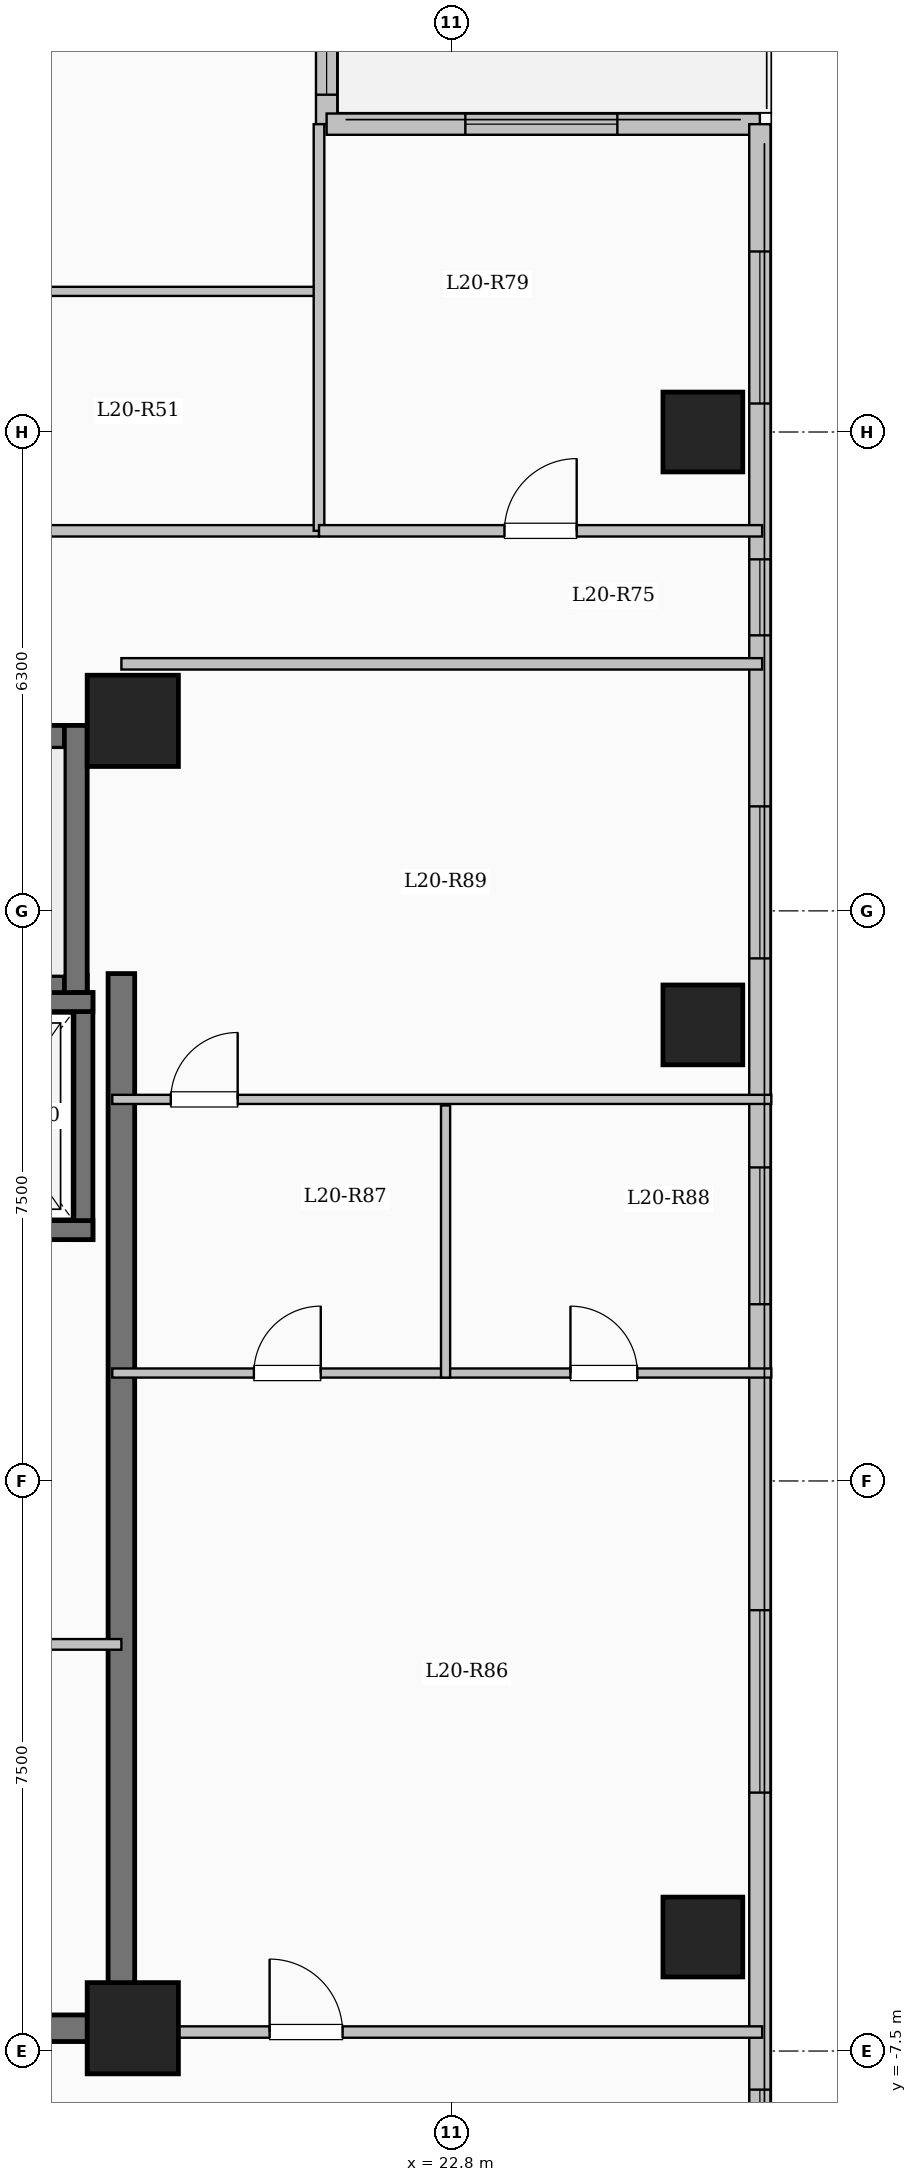
"""IFC4 building model, lengths in metres.
Left out: names, types, materials, properties, quantities, classifications, styles, units other than length and angle.
Written with IfcOpenShell. Run it as: python <this file> out.ifc"""

import sys

from ifc_helpers import new_model, si_unit, direction, frame, frame_2d, origin, origin_2d, place, context, subcontext, project, spatial, rectangle, extrude, element, fill, save


model = new_model("IFC4")
c1 = context("Model", 3, precision=1e-05, world=origin(), true_north=direction((0.0, 1.0)))
c2 = subcontext(c1, "Body", "Model", "MODEL_VIEW")
j1 = project(units=[si_unit("LENGTHUNIT", "METRE"), si_unit("PLANEANGLEUNIT", "RADIAN")], contexts=[c1])
p1 = place(None, origin())
s1 = spatial("IfcSite", under=j1, at=p1, CompositionType="ELEMENT")
p2 = place(p1, origin())
s2 = spatial("IfcBuilding", under=s1, at=p2, CompositionType="ELEMENT")
p3 = place(p2, frame((0.0, 0.0, 78.3)))
s3 = spatial("IfcBuildingStorey", under=s2, at=p3, CompositionType="ELEMENT", Elevation=78.3)
for number, where, z_axis, x_axis in (
    (1, (18.6, -7.2, 0.0), (0.0, 0.0, 1.0), (1.0, 0.0, 0.0)),
    (2, (18.6, 10.0, 0.0), (0.0, 0.0, 1.0), (1.0, 0.0, 0.0)),
):
    element("IfcColumn", number, at=place(p3, frame(where, z_axis=z_axis, x_axis=x_axis)), inside=s3, PredefinedType="COLUMN", context=c2, shape_type="SweptSolid", body=[
        extrude(rectangle(XDim=1.2, YDim=1.2, at=origin_2d()), origin(), (0.0, 0.0, 1.0), 3.35),
    ])
for number, where, z_axis, x_axis in (
    (3, (26.1, -6.0, 0.0), (0.0, 0.0, 1.0), (1.0, 0.0, 0.0)),
    (4, (26.1, 6.0, 0.0), (0.0, 0.0, 1.0), (1.0, 0.0, 0.0)),
    (5, (26.1, 13.8, 0.0), (0.0, 0.0, 1.0), (1.0, 0.0, 0.0)),
):
    element("IfcColumn", number, at=place(p3, frame(where, z_axis=z_axis, x_axis=x_axis)), inside=s3, PredefinedType="COLUMN", context=c2, shape_type="SweptSolid", body=[
        extrude(rectangle(XDim=1.05, YDim=1.05, at=origin_2d()), origin(), (0.0, 0.0, 1.0), 3.35),
    ])
p4 = place(p3, frame((21.15, 22.05, 0.0), z_axis=(0.0, 0.0, 1.0), x_axis=(0.0, -1.0, 0.0)))
e6 = element("IfcWall", 6, at=p4, inside=s3, PredefinedType="SOLIDWALL", context=c2, shape_type="SweptSolid", body=[
    extrude(rectangle(XDim=4.2, YDim=0.28, at=frame_2d((2.1, 0.0))), origin(), (0.0, 0.0, 1.0), 3.1),
])
p5 = place(p4, frame((1.5, 0.0, 0.0)))
e7 = element("IfcOpeningElement", 7, at=p5, cuts=e6, PredefinedType="OPENING", context=c2, shape_type="SweptSolid", body=[
    extrude(rectangle(XDim=1.1, YDim=2.2, at=frame_2d((0.55, 1.1))), frame((0.0, 0.15, 0.0), z_axis=(0.0, -1.0, 0.0), x_axis=(1.0, 0.0, 0.0)), (0.0, 0.0, 1.0), 0.3),
])
p6 = place(p4, frame((2.812, 0.0, 0.95)))
e8 = element("IfcOpeningElement", 8, at=p6, cuts=e6, PredefinedType="OPENING", context=c2, shape_type="SweptSolid", body=[
    extrude(rectangle(XDim=1.0, YDim=1.5, at=frame_2d((0.5, 0.75))), frame((0.0, 0.15, 0.0), z_axis=(0.0, -1.0, 0.0), x_axis=(1.0, 0.0, 0.0)), (0.0, 0.0, 1.0), 0.3),
])
p7 = place(p3, frame((21.15, 17.85, 0.0), z_axis=(0.0, 0.0, 1.0), x_axis=(1.0, 0.0, 0.0)))
e9 = element("IfcWall", 9, at=p7, inside=s3, PredefinedType="SOLIDWALL", context=c2, shape_type="SweptSolid", body=[
    extrude(rectangle(XDim=5.7, YDim=0.28, at=frame_2d((2.85, 0.0))), origin(), (0.0, 0.0, 1.0), 3.1),
])
p8 = place(p7, frame((1.825, 0.0, 0.9)))
e10 = element("IfcOpeningElement", 10, at=p8, cuts=e9, PredefinedType="OPENING", context=c2, shape_type="SweptSolid", body=[
    extrude(rectangle(XDim=2.0, YDim=1.7, at=frame_2d((1.0, 0.85))), frame((0.0, 0.15, 0.0), z_axis=(0.0, -1.0, 0.0), x_axis=(1.0, 0.0, 0.0)), (0.0, 0.0, 1.0), 0.3),
])
p9 = place(p3, frame((26.85, 17.85, 0.0), z_axis=(0.0, 0.0, 1.0), x_axis=(0.0, -1.0, 0.0)))
e11 = element("IfcWall", 11, at=p9, inside=s3, PredefinedType="SOLIDWALL", context=c2, shape_type="SweptSolid", body=[
    extrude(rectangle(XDim=35.7, YDim=0.28, at=frame_2d((17.85, 0.0))), origin(), (0.0, 0.0, 1.0), 3.1),
])
p10 = place(p9, frame((1.675, 0.0, 0.9)))
e12 = element("IfcOpeningElement", 12, at=p10, cuts=e11, PredefinedType="OPENING", context=c2, shape_type="SweptSolid", body=[
    extrude(rectangle(XDim=2.0, YDim=1.7, at=frame_2d((1.0, 0.85))), frame((0.0, 0.15, 0.0), z_axis=(0.0, -1.0, 0.0), x_axis=(1.0, 0.0, 0.0)), (0.0, 0.0, 1.0), 0.3),
])
p11 = place(p9, frame((5.725, 0.0, 0.95)))
e13 = element("IfcOpeningElement", 13, at=p11, cuts=e11, PredefinedType="OPENING", context=c2, shape_type="SweptSolid", body=[
    extrude(rectangle(XDim=1.0, YDim=1.5, at=frame_2d((0.5, 0.75))), frame((0.0, 0.15, 0.0), z_axis=(0.0, -1.0, 0.0), x_axis=(1.0, 0.0, 0.0)), (0.0, 0.0, 1.0), 0.3),
])
p12 = place(p9, frame((8.975, 0.0, 0.9)))
e14 = element("IfcOpeningElement", 14, at=p12, cuts=e11, PredefinedType="OPENING", context=c2, shape_type="SweptSolid", body=[
    extrude(rectangle(XDim=2.0, YDim=1.7, at=frame_2d((1.0, 0.85))), frame((0.0, 0.15, 0.0), z_axis=(0.0, -1.0, 0.0), x_axis=(1.0, 0.0, 0.0)), (0.0, 0.0, 1.0), 0.3),
])
p13 = place(p9, frame((13.725, 0.0, 0.9)))
e15 = element("IfcOpeningElement", 15, at=p13, cuts=e11, PredefinedType="OPENING", context=c2, shape_type="SweptSolid", body=[
    extrude(rectangle(XDim=1.8, YDim=1.65, at=frame_2d((0.9, 0.825))), frame((0.0, 0.15, 0.0), z_axis=(0.0, -1.0, 0.0), x_axis=(1.0, 0.0, 0.0)), (0.0, 0.0, 1.0), 0.3),
])
p14 = place(p9, frame((19.55, 0.0, 0.9)))
e16 = element("IfcOpeningElement", 16, at=p14, cuts=e11, PredefinedType="OPENING", context=c2, shape_type="SweptSolid", body=[
    extrude(rectangle(XDim=2.4, YDim=1.8, at=frame_2d((1.2, 0.9))), frame((0.0, 0.15, 0.0), z_axis=(0.0, -1.0, 0.0), x_axis=(1.0, 0.0, 0.0)), (0.0, 0.0, 1.0), 0.3),
])
p15 = place(p9, frame((25.857, 0.0, 0.9)))
e17 = element("IfcOpeningElement", 17, at=p15, cuts=e11, PredefinedType="OPENING", context=c2, shape_type="SweptSolid", body=[
    extrude(rectangle(XDim=1.5, YDim=1.65, at=frame_2d((0.75, 0.825))), frame((0.0, 0.15, 0.0), z_axis=(0.0, -1.0, 0.0), x_axis=(1.0, 0.0, 0.0)), (0.0, 0.0, 1.0), 0.3),
])
p16 = place(p9, frame((30.75, 0.0, 0.9)))
e18 = element("IfcOpeningElement", 18, at=p16, cuts=e11, PredefinedType="OPENING", context=c2, shape_type="SweptSolid", body=[
    extrude(rectangle(XDim=2.4, YDim=1.8, at=frame_2d((1.2, 0.9))), frame((0.0, 0.15, 0.0), z_axis=(0.0, -1.0, 0.0), x_axis=(1.0, 0.0, 0.0)), (0.0, 0.0, 1.0), 0.3),
])
p17 = place(p3, frame((10.0, 9.79, 0.0), z_axis=(0.0, 0.0, 1.0), x_axis=(1.0, 0.0, 0.0)))
e19 = element("IfcWall", 19, at=p17, inside=s3, PredefinedType="SHEAR", context=c2, shape_type="SweptSolid", body=[
    extrude(rectangle(XDim=8.0, YDim=0.3, at=frame_2d((4.0, 0.0))), origin(), (0.0, 0.0, 1.0), 3.35),
])
p18 = place(p3, frame((10.0, 6.5, 0.0), z_axis=(0.0, 0.0, 1.0), x_axis=(1.0, 0.0, 0.0)))
e20 = element("IfcWall", 20, at=p18, inside=s3, PredefinedType="SHEAR", context=c2, shape_type="SweptSolid", body=[
    extrude(rectangle(XDim=8.0, YDim=0.3, at=frame_2d((4.0, 0.0))), origin(), (0.0, 0.0, 1.0), 3.35),
])
p19 = place(p18, frame((0.55, 0.0, 0.0)))
e21 = element("IfcOpeningElement", 21, at=p19, cuts=e20, PredefinedType="OPENING", context=c2, shape_type="SweptSolid", body=[
    extrude(rectangle(XDim=1.0, YDim=2.15, at=frame_2d((0.5, 1.075))), frame((0.0, 0.16, 0.0), z_axis=(0.0, -1.0, 0.0), x_axis=(1.0, 0.0, 0.0)), (0.0, 0.0, 1.0), 0.32),
])
p20 = place(p3, frame((17.85, 6.35, 0.0), z_axis=(0.0, 0.0, 1.0), x_axis=(0.0, 1.0, 0.0)))
e22 = element("IfcWall", 22, at=p20, inside=s3, PredefinedType="SHEAR", context=c2, shape_type="SweptSolid", body=[
    extrude(rectangle(XDim=3.59, YDim=0.3, at=frame_2d((1.795, 0.0))), origin(), (0.0, 0.0, 1.0), 3.35),
])
p21 = place(p3, frame((17.95, 3.175, 0.0), z_axis=(0.0, 0.0, 1.0), x_axis=(0.0, 1.0, 0.0)))
e23 = element("IfcWall", 23, at=p21, inside=s3, PredefinedType="SHEAR", context=c2, shape_type="SweptSolid", body=[
    extrude(rectangle(XDim=3.25, YDim=0.25, at=frame_2d((1.625, 0.0))), origin(), (0.0, 0.0, 1.0), 3.35),
])
for number, where, z_axis, x_axis in (
    (24, (15.525, 3.3, 0.0), (0.0, 0.0, 1.0), (1.0, 0.0, 0.0)),
    (25, (15.525, 6.3, 0.0), (0.0, 0.0, 1.0), (1.0, 0.0, 0.0)),
):
    element("IfcWall", number, at=place(p3, frame(where, z_axis=z_axis, x_axis=x_axis)), inside=s3, PredefinedType="SHEAR", context=c2, shape_type="SweptSolid", body=[
        extrude(rectangle(XDim=2.55, YDim=0.25, at=frame_2d((1.275, 0.0))), origin(), (0.0, 0.0, 1.0), 3.35),
    ])
p22 = place(p3, frame((18.45, -7.375, 0.0), z_axis=(0.0, 0.0, 1.0), x_axis=(0.0, 1.0, 0.0)))
e26 = element("IfcWall", 26, at=p22, inside=s3, PredefinedType="SHEAR", context=c2, shape_type="SweptSolid", body=[
    extrude(rectangle(XDim=14.05, YDim=0.35, at=frame_2d((7.025, 0.0))), origin(), (0.0, 0.0, 1.0), 3.35),
])
p23 = place(p3, frame((10.075, -7.2, 0.0), z_axis=(0.0, 0.0, 1.0), x_axis=(1.0, 0.0, 0.0)))
e27 = element("IfcWall", 27, at=p23, inside=s3, PredefinedType="SHEAR", context=c2, shape_type="SweptSolid", body=[
    extrude(rectangle(XDim=8.55, YDim=0.35, at=frame_2d((4.275, 0.0))), origin(), (0.0, 0.0, 1.0), 3.35),
])
p24 = place(p3, frame((15.4, -2.15, 0.0), z_axis=(0.0, 0.0, 1.0), x_axis=(1.0, 0.0, 0.0)))
e28 = element("IfcWall", 28, at=p24, inside=s3, PredefinedType="PARTITIONING", context=c2, shape_type="SweptSolid", body=[
    extrude(rectangle(XDim=3.05, YDim=0.14, at=frame_2d((1.525, 0.0))), origin(), (0.0, 0.0, 1.0), 3.1),
])
p25 = place(p24, frame((1.05, 0.0, 0.0)))
e29 = element("IfcOpeningElement", 29, at=p25, cuts=e28, PredefinedType="OPENING", context=c2, shape_type="SweptSolid", body=[
    extrude(rectangle(XDim=0.9, YDim=2.08, at=frame_2d((0.45, 1.04))), frame((0.0, 0.08, 0.0), z_axis=(0.0, -1.0, 0.0), x_axis=(1.0, 0.0, 0.0)), (0.0, 0.0, 1.0), 0.16),
])
p26 = place(p3, frame((3.85, 12.5, 0.0), z_axis=(0.0, 0.0, 1.0), x_axis=(1.0, 0.0, 0.0)))
e30 = element("IfcWall", 30, at=p26, inside=s3, PredefinedType="PARTITIONING", context=c2, shape_type="SweptSolid", body=[
    extrude(rectangle(XDim=17.2, YDim=0.15, at=frame_2d((8.6, 0.0))), origin(), (0.0, 0.0, 1.0), 3.1),
])
p27 = place(p26, frame((1.3, 0.0, 0.0)))
e31 = element("IfcOpeningElement", 31, at=p27, cuts=e30, PredefinedType="OPENING", context=c2, shape_type="SweptSolid", body=[
    extrude(rectangle(XDim=0.96, YDim=2.15, at=frame_2d((0.48, 1.075))), frame((0.0, 0.085, 0.0), z_axis=(0.0, -1.0, 0.0), x_axis=(1.0, 0.0, 0.0)), (0.0, 0.0, 1.0), 0.17),
])
p28 = place(p26, frame((8.06, 0.0, 0.0)))
e32 = element("IfcOpeningElement", 32, at=p28, cuts=e30, PredefinedType="OPENING", context=c2, shape_type="SweptSolid", body=[
    extrude(rectangle(XDim=0.96, YDim=2.15, at=frame_2d((0.48, 1.075))), frame((0.0, 0.085, 0.0), z_axis=(0.0, -1.0, 0.0), x_axis=(1.0, 0.0, 0.0)), (0.0, 0.0, 1.0), 0.17),
])
p29 = place(p3, frame((16.23, 15.65, 0.0), z_axis=(0.0, 0.0, 1.0), x_axis=(1.0, 0.0, 0.0)))
e33 = element("IfcWall", 33, at=p29, inside=s3, PredefinedType="PARTITIONING", context=c2, shape_type="SweptSolid", body=[
    extrude(rectangle(XDim=4.88, YDim=0.12, at=frame_2d((2.44, 0.0))), origin(), (0.0, 0.0, 1.0), 3.1),
])
p30 = place(p3, frame((18.45, -7.25, 0.0), z_axis=(0.0, 0.0, 1.0), x_axis=(1.0, 0.0, 0.0)))
e34 = element("IfcWall", 34, at=p30, inside=s3, PredefinedType="PARTITIONING", context=c2, shape_type="SweptSolid", body=[
    extrude(rectangle(XDim=8.43, YDim=0.15, at=frame_2d((4.215, 0.0))), origin(), (0.0, 0.0, 1.0), 3.1),
])
p31 = place(p30, frame((1.95, 0.0, 0.0)))
e35 = element("IfcOpeningElement", 35, at=p31, cuts=e34, PredefinedType="OPENING", context=c2, shape_type="SweptSolid", body=[
    extrude(rectangle(XDim=0.96, YDim=2.15, at=frame_2d((0.48, 1.075))), frame((0.0, 0.085, 0.0), z_axis=(0.0, -1.0, 0.0), x_axis=(1.0, 0.0, 0.0)), (0.0, 0.0, 1.0), 0.17),
])
p32 = place(p3, frame((18.45, 10.75, 0.0), z_axis=(0.0, 0.0, 1.0), x_axis=(1.0, 0.0, 0.0)))
e36 = element("IfcWall", 36, at=p32, inside=s3, PredefinedType="PARTITIONING", context=c2, shape_type="SweptSolid", body=[
    extrude(rectangle(XDim=8.43, YDim=0.15, at=frame_2d((4.215, 0.0))), origin(), (0.0, 0.0, 1.0), 3.1),
])
p33 = place(p3, frame((21.05, 12.5, 0.0), z_axis=(0.0, 0.0, 1.0), x_axis=(0.0, 1.0, 0.0)))
e37 = element("IfcWall", 37, at=p33, inside=s3, PredefinedType="PARTITIONING", context=c2, shape_type="SweptSolid", body=[
    extrude(rectangle(XDim=5.35, YDim=0.14, at=frame_2d((2.675, 0.0))), origin(), (0.0, 0.0, 1.0), 3.1),
])
p34 = place(p3, frame((21.05, 12.5, 0.0), z_axis=(0.0, 0.0, 1.0), x_axis=(1.0, 0.0, 0.0)))
e38 = element("IfcWall", 38, at=p34, inside=s3, PredefinedType="PARTITIONING", context=c2, shape_type="SweptSolid", body=[
    extrude(rectangle(XDim=5.83, YDim=0.15, at=frame_2d((2.915, 0.0))), origin(), (0.0, 0.0, 1.0), 3.1),
])
p35 = place(p34, frame((2.44, 0.0, 0.0)))
e39 = element("IfcOpeningElement", 39, at=p35, cuts=e38, PredefinedType="OPENING", context=c2, shape_type="SweptSolid", body=[
    extrude(rectangle(XDim=0.95, YDim=2.15, at=frame_2d((0.475, 1.075))), frame((0.0, 0.085, 0.0), z_axis=(0.0, -1.0, 0.0), x_axis=(1.0, 0.0, 0.0)), (0.0, 0.0, 1.0), 0.17),
])
p36 = place(p3, frame((18.33, 1.42, 0.0), z_axis=(0.0, 0.0, 1.0), x_axis=(1.0, 0.0, 0.0)))
e40 = element("IfcWall", 40, at=p36, inside=s3, PredefinedType="PARTITIONING", context=c2, shape_type="SweptSolid", body=[
    extrude(rectangle(XDim=8.67, YDim=0.12, at=frame_2d((4.335, 0.0))), origin(), (0.0, 0.0, 1.0), 3.1),
])
p37 = place(p36, frame((1.863, 0.0, 0.0)))
e41 = element("IfcOpeningElement", 41, at=p37, cuts=e40, PredefinedType="OPENING", context=c2, shape_type="SweptSolid", body=[
    extrude(rectangle(XDim=0.88, YDim=2.1, at=frame_2d((0.44, 1.05))), frame((0.0, 0.07, 0.0), z_axis=(0.0, -1.0, 0.0), x_axis=(1.0, 0.0, 0.0)), (0.0, 0.0, 1.0), 0.14),
])
p38 = place(p36, frame((6.028, 0.0, 0.0)))
e42 = element("IfcOpeningElement", 42, at=p38, cuts=e40, PredefinedType="OPENING", context=c2, shape_type="SweptSolid", body=[
    extrude(rectangle(XDim=0.88, YDim=2.1, at=frame_2d((0.44, 1.05))), frame((0.0, 0.07, 0.0), z_axis=(0.0, -1.0, 0.0), x_axis=(1.0, 0.0, 0.0)), (0.0, 0.0, 1.0), 0.14),
])
p39 = place(p3, frame((18.33, 5.02, 0.0), z_axis=(0.0, 0.0, 1.0), x_axis=(1.0, 0.0, 0.0)))
e43 = element("IfcWall", 43, at=p39, inside=s3, PredefinedType="PARTITIONING", context=c2, shape_type="SweptSolid", body=[
    extrude(rectangle(XDim=8.67, YDim=0.12, at=frame_2d((4.335, 0.0))), origin(), (0.0, 0.0, 1.0), 3.1),
])
p40 = place(p39, frame((0.77, 0.0, 0.0)))
e44 = element("IfcOpeningElement", 44, at=p40, cuts=e43, PredefinedType="OPENING", context=c2, shape_type="SweptSolid", body=[
    extrude(rectangle(XDim=0.88, YDim=2.1, at=frame_2d((0.44, 1.05))), frame((0.0, 0.07, 0.0), z_axis=(0.0, -1.0, 0.0), x_axis=(1.0, 0.0, 0.0)), (0.0, 0.0, 1.0), 0.14),
])
p41 = place(p3, frame((22.715, 1.36, 0.0), z_axis=(0.0, 0.0, 1.0), x_axis=(0.0, 1.0, 0.0)))
e45 = element("IfcWall", 45, at=p41, inside=s3, PredefinedType="PARTITIONING", context=c2, shape_type="SweptSolid", body=[
    extrude(rectangle(XDim=3.58, YDim=0.12, at=frame_2d((1.79, 0.0))), origin(), (0.0, 0.0, 1.0), 3.1),
])
p42 = place(p6, origin())
e46 = element("IfcWindow", 46, at=p42, inside=s3, PartitioningType="SINGLE_PANEL", PredefinedType="WINDOW", context=c2, shape_type="SweptSolid", body=[
    extrude(rectangle(XDim=1.0, YDim=1.5, at=frame_2d((0.5, 0.75))), frame((0.0, 0.03, 0.0), z_axis=(0.0, -1.0, 0.0), x_axis=(1.0, 0.0, 0.0)), (0.0, 0.0, 1.0), 0.06),
])
fill(e8, e46)
p43 = place(p8, origin())
e47 = element("IfcWindow", 47, at=p43, inside=s3, PartitioningType="SINGLE_PANEL", PredefinedType="WINDOW", context=c2, shape_type="SweptSolid", body=[
    extrude(rectangle(XDim=2.0, YDim=1.7, at=frame_2d((1.0, 0.85))), frame((0.0, 0.03, 0.0), z_axis=(0.0, -1.0, 0.0), x_axis=(1.0, 0.0, 0.0)), (0.0, 0.0, 1.0), 0.06),
])
fill(e10, e47)
p44 = place(p10, origin())
e48 = element("IfcWindow", 48, at=p44, inside=s3, PartitioningType="SINGLE_PANEL", PredefinedType="WINDOW", context=c2, shape_type="SweptSolid", body=[
    extrude(rectangle(XDim=2.0, YDim=1.7, at=frame_2d((1.0, 0.85))), frame((0.0, 0.03, 0.0), z_axis=(0.0, -1.0, 0.0), x_axis=(1.0, 0.0, 0.0)), (0.0, 0.0, 1.0), 0.06),
])
fill(e12, e48)
p45 = place(p11, origin())
e49 = element("IfcWindow", 49, at=p45, inside=s3, PartitioningType="SINGLE_PANEL", PredefinedType="WINDOW", context=c2, shape_type="SweptSolid", body=[
    extrude(rectangle(XDim=1.0, YDim=1.5, at=frame_2d((0.5, 0.75))), frame((0.0, 0.03, 0.0), z_axis=(0.0, -1.0, 0.0), x_axis=(1.0, 0.0, 0.0)), (0.0, 0.0, 1.0), 0.06),
])
fill(e13, e49)
p46 = place(p12, origin())
e50 = element("IfcWindow", 50, at=p46, inside=s3, PartitioningType="SINGLE_PANEL", PredefinedType="WINDOW", context=c2, shape_type="SweptSolid", body=[
    extrude(rectangle(XDim=2.0, YDim=1.7, at=frame_2d((1.0, 0.85))), frame((0.0, 0.03, 0.0), z_axis=(0.0, -1.0, 0.0), x_axis=(1.0, 0.0, 0.0)), (0.0, 0.0, 1.0), 0.06),
])
fill(e14, e50)
p47 = place(p13, origin())
e51 = element("IfcWindow", 51, at=p47, inside=s3, PartitioningType="SINGLE_PANEL", PredefinedType="WINDOW", context=c2, shape_type="SweptSolid", body=[
    extrude(rectangle(XDim=1.8, YDim=1.65, at=frame_2d((0.9, 0.825))), frame((0.0, 0.03, 0.0), z_axis=(0.0, -1.0, 0.0), x_axis=(1.0, 0.0, 0.0)), (0.0, 0.0, 1.0), 0.06),
])
fill(e15, e51)
p48 = place(p14, origin())
e52 = element("IfcWindow", 52, at=p48, inside=s3, PartitioningType="SINGLE_PANEL", PredefinedType="WINDOW", context=c2, shape_type="SweptSolid", body=[
    extrude(rectangle(XDim=2.4, YDim=1.8, at=frame_2d((1.2, 0.9))), frame((0.0, 0.03, 0.0), z_axis=(0.0, -1.0, 0.0), x_axis=(1.0, 0.0, 0.0)), (0.0, 0.0, 1.0), 0.06),
])
fill(e16, e52)
p49 = place(p15, origin())
e53 = element("IfcWindow", 53, at=p49, inside=s3, PartitioningType="SINGLE_PANEL", PredefinedType="WINDOW", context=c2, shape_type="SweptSolid", body=[
    extrude(rectangle(XDim=1.5, YDim=1.65, at=frame_2d((0.75, 0.825))), frame((0.0, 0.03, 0.0), z_axis=(0.0, -1.0, 0.0), x_axis=(1.0, 0.0, 0.0)), (0.0, 0.0, 1.0), 0.06),
])
fill(e17, e53)
p50 = place(p35, origin())
e54 = element("IfcDoor", 54, at=p50, inside=s3, OperationType="SINGLE_SWING_RIGHT", PredefinedType="DOOR", context=c2, shape_type="SweptSolid", body=[
    extrude(rectangle(XDim=0.95, YDim=2.15, at=frame_2d((0.475, 1.075))), frame((0.0, 0.025, 0.0), z_axis=(0.0, -1.0, 0.0), x_axis=(1.0, 0.0, 0.0)), (0.0, 0.0, 1.0), 0.05),
])
fill(e39, e54)
p51 = place(p31, origin())
e55 = element("IfcDoor", 55, at=p51, inside=s3, OperationType="SINGLE_SWING_LEFT", PredefinedType="DOOR", context=c2, shape_type="SweptSolid", body=[
    extrude(rectangle(XDim=0.96, YDim=2.15, at=frame_2d((0.48, 1.075))), frame((0.0, 0.025, 0.0), z_axis=(0.0, -1.0, 0.0), x_axis=(1.0, 0.0, 0.0)), (0.0, 0.0, 1.0), 0.05),
])
fill(e35, e55)
p52 = place(p37, origin())
e56 = element("IfcDoor", 56, at=p52, inside=s3, OperationType="SINGLE_SWING_RIGHT", PredefinedType="DOOR", context=c2, shape_type="SweptSolid", body=[
    extrude(rectangle(XDim=0.88, YDim=2.1, at=frame_2d((0.44, 1.05))), frame((0.0, 0.025, 0.0), z_axis=(0.0, -1.0, 0.0), x_axis=(1.0, 0.0, 0.0)), (0.0, 0.0, 1.0), 0.05),
])
fill(e41, e56)
p53 = place(p38, origin())
e57 = element("IfcDoor", 57, at=p53, inside=s3, OperationType="SINGLE_SWING_LEFT", PredefinedType="DOOR", context=c2, shape_type="SweptSolid", body=[
    extrude(rectangle(XDim=0.88, YDim=2.1, at=frame_2d((0.44, 1.05))), frame((0.0, 0.025, 0.0), z_axis=(0.0, -1.0, 0.0), x_axis=(1.0, 0.0, 0.0)), (0.0, 0.0, 1.0), 0.05),
])
fill(e42, e57)
p54 = place(p40, origin())
e58 = element("IfcDoor", 58, at=p54, inside=s3, OperationType="SINGLE_SWING_RIGHT", PredefinedType="DOOR", context=c2, shape_type="SweptSolid", body=[
    extrude(rectangle(XDim=0.88, YDim=2.1, at=frame_2d((0.44, 1.05))), frame((0.0, 0.025, 0.0), z_axis=(0.0, -1.0, 0.0), x_axis=(1.0, 0.0, 0.0)), (0.0, 0.0, 1.0), 0.05),
])
fill(e44, e58)
save(model, sys.argv[1])
